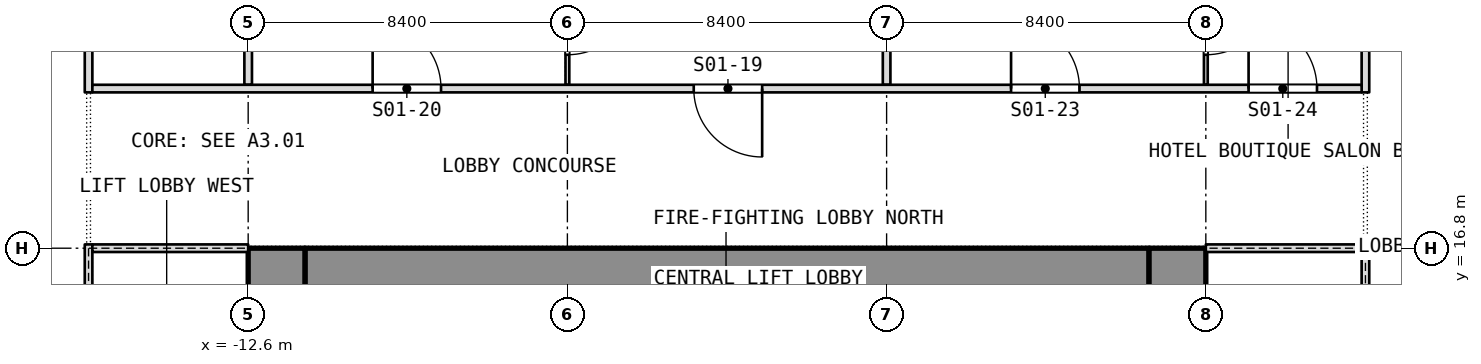
"""IFC4 building model, lengths in metres.
Left out: names, types, materials, properties, quantities, classifications, styles, units other than length and angle.
Written with IfcOpenShell. Run it as: python <this file> out.ifc"""

import sys

from ifc_helpers import new_model, si_unit, direction, frame, frame_2d, origin, place, context, subcontext, project, spatial, rectangle, extrude, element, fill, save


model = new_model("IFC4")
c1 = context("Model", 3, precision=1e-05, world=origin(), true_north=direction((0.0, 1.0)))
c2 = subcontext(c1, "Body", "Model", "MODEL_VIEW")
j1 = project(units=[si_unit("LENGTHUNIT", "METRE"), si_unit("PLANEANGLEUNIT", "RADIAN")], contexts=[c1])
p1 = place(None, origin())
s1 = spatial("IfcSite", under=j1, at=p1, CompositionType="ELEMENT")
p2 = place(p1, origin())
s2 = spatial("IfcBuilding", under=s1, at=p2, CompositionType="ELEMENT")
p3 = place(p2, origin())
s3 = spatial("IfcBuildingStorey", under=s2, at=p3, CompositionType="ELEMENT", Elevation=0.0)
p4 = place(p3, frame((11.85, 0.0, -0.3), z_axis=(0.0, 0.0, 1.0), x_axis=(0.0, 1.0, 0.0)))
e1 = element("IfcWall", 1, at=p4, inside=s3, PredefinedType="SHEAR", context=c2, shape_type="SweptSolid", body=[
    extrude(rectangle(XDim=16.8, YDim=1.5, at=frame_2d((8.4, 0.0))), origin(), (0.0, 0.0, 1.0), 8.3),
])
p5 = place(p4, frame((3.6, 0.0, 0.3)))
e2 = element("IfcOpeningElement", 2, at=p5, cuts=e1, PredefinedType="OPENING", context=c2, shape_type="SweptSolid", body=[
    extrude(rectangle(XDim=0.9, YDim=2.1, at=frame_2d((0.45, 1.05))), frame((0.0, 0.75, 0.0), z_axis=(0.0, -1.0, 0.0), x_axis=(1.0, 0.0, 0.0)), (0.0, 0.0, 1.0), 1.5),
])
p6 = place(p4, frame((6.825, 0.0, 0.3)))
e3 = element("IfcOpeningElement", 3, at=p6, cuts=e1, PredefinedType="OPENING", context=c2, shape_type="SweptSolid", body=[
    extrude(rectangle(XDim=1.2, YDim=2.1, at=frame_2d((0.6, 1.05))), frame((0.0, 0.75, 0.0), z_axis=(0.0, -1.0, 0.0), x_axis=(1.0, 0.0, 0.0)), (0.0, 0.0, 1.0), 1.5),
])
p7 = place(p4, frame((12.3, 0.0, 0.3)))
e4 = element("IfcOpeningElement", 4, at=p7, cuts=e1, PredefinedType="OPENING", context=c2, shape_type="SweptSolid", body=[
    extrude(rectangle(XDim=0.9, YDim=2.1, at=frame_2d((0.45, 1.05))), frame((0.0, 0.75, 0.0), z_axis=(0.0, -1.0, 0.0), x_axis=(1.0, 0.0, 0.0)), (0.0, 0.0, 1.0), 1.5),
])
p8 = place(p4, frame((8.775, 0.0, 0.3)))
e5 = element("IfcOpeningElement", 5, at=p8, cuts=e1, PredefinedType="OPENING", context=c2, shape_type="SweptSolid", body=[
    extrude(rectangle(XDim=1.2, YDim=2.1, at=frame_2d((0.6, 1.05))), frame((0.0, 0.75, 0.0), z_axis=(0.0, -1.0, 0.0), x_axis=(1.0, 0.0, 0.0)), (0.0, 0.0, 1.0), 1.5),
])
p9 = place(p3, frame((-11.85, 0.0, -0.3), z_axis=(0.0, 0.0, 1.0), x_axis=(0.0, 1.0, 0.0)))
e6 = element("IfcWall", 6, at=p9, inside=s3, PredefinedType="SHEAR", context=c2, shape_type="SweptSolid", body=[
    extrude(rectangle(XDim=16.8, YDim=1.5, at=frame_2d((8.4, 0.0))), origin(), (0.0, 0.0, 1.0), 8.3),
])
p10 = place(p9, frame((2.3, 0.0, 0.3)))
e7 = element("IfcOpeningElement", 7, at=p10, cuts=e6, PredefinedType="OPENING", context=c2, shape_type="SweptSolid", body=[
    extrude(rectangle(XDim=1.1, YDim=2.1, at=frame_2d((0.55, 1.05))), frame((0.0, 0.75, 0.0), z_axis=(0.0, -1.0, 0.0), x_axis=(1.0, 0.0, 0.0)), (0.0, 0.0, 1.0), 1.5),
])
p11 = place(p9, frame((4.85, 0.0, 0.3)))
e8 = element("IfcOpeningElement", 8, at=p11, cuts=e6, PredefinedType="OPENING", context=c2, shape_type="SweptSolid", body=[
    extrude(rectangle(XDim=1.1, YDim=2.1, at=frame_2d((0.55, 1.05))), frame((0.0, 0.75, 0.0), z_axis=(0.0, -1.0, 0.0), x_axis=(1.0, 0.0, 0.0)), (0.0, 0.0, 1.0), 1.5),
])
p12 = place(p9, frame((6.825, 0.0, 0.3)))
e9 = element("IfcOpeningElement", 9, at=p12, cuts=e6, PredefinedType="OPENING", context=c2, shape_type="SweptSolid", body=[
    extrude(rectangle(XDim=1.2, YDim=2.1, at=frame_2d((0.6, 1.05))), frame((0.0, 0.75, 0.0), z_axis=(0.0, -1.0, 0.0), x_axis=(1.0, 0.0, 0.0)), (0.0, 0.0, 1.0), 1.5),
])
p13 = place(p9, frame((13.4, 0.0, 0.3)))
e10 = element("IfcOpeningElement", 10, at=p13, cuts=e6, PredefinedType="OPENING", context=c2, shape_type="SweptSolid", body=[
    extrude(rectangle(XDim=1.1, YDim=2.1, at=frame_2d((0.55, 1.05))), frame((0.0, 0.75, 0.0), z_axis=(0.0, -1.0, 0.0), x_axis=(1.0, 0.0, 0.0)), (0.0, 0.0, 1.0), 1.5),
])
p14 = place(p9, frame((10.85, 0.0, 0.3)))
e11 = element("IfcOpeningElement", 11, at=p14, cuts=e6, PredefinedType="OPENING", context=c2, shape_type="SweptSolid", body=[
    extrude(rectangle(XDim=1.1, YDim=2.1, at=frame_2d((0.55, 1.05))), frame((0.0, 0.75, 0.0), z_axis=(0.0, -1.0, 0.0), x_axis=(1.0, 0.0, 0.0)), (0.0, 0.0, 1.0), 1.5),
])
p15 = place(p9, frame((8.775, 0.0, 0.3)))
e12 = element("IfcOpeningElement", 12, at=p15, cuts=e6, PredefinedType="OPENING", context=c2, shape_type="SweptSolid", body=[
    extrude(rectangle(XDim=1.2, YDim=2.1, at=frame_2d((0.6, 1.05))), frame((0.0, 0.75, 0.0), z_axis=(0.0, -1.0, 0.0), x_axis=(1.0, 0.0, 0.0)), (0.0, 0.0, 1.0), 1.5),
])
p16 = place(p3, frame((-11.1, 16.05, -0.3), z_axis=(0.0, 0.0, 1.0), x_axis=(1.0, 0.0, 0.0)))
e13 = element("IfcWall", 13, at=p16, inside=s3, PredefinedType="SHEAR", context=c2, shape_type="SweptSolid", body=[
    extrude(rectangle(XDim=22.2, YDim=1.5, at=frame_2d((11.1, 0.0))), origin(), (0.0, 0.0, 1.0), 8.3),
])
p17 = place(p3, frame((16.8, 20.9, 0.0), z_axis=(0.0, 0.0, 1.0), x_axis=(0.0, 1.0, 0.0)))
e14 = element("IfcWall", 14, at=p17, inside=s3, PredefinedType="PARTITIONING", context=c2, shape_type="SweptSolid", body=[
    extrude(rectangle(XDim=15.0, YDim=0.2, at=frame_2d((7.5, 0.0))), origin(), (0.0, 0.0, 1.0), 7.68),
])
p18 = place(p3, frame((12.6, 21.1, 0.0), z_axis=(0.0, 0.0, 1.0), x_axis=(0.0, 1.0, 0.0)))
e15 = element("IfcWall", 15, at=p18, inside=s3, PredefinedType="PARTITIONING", context=c2, shape_type="SweptSolid", body=[
    extrude(rectangle(XDim=3.38, YDim=0.1, at=frame_2d((1.69, 0.0))), origin(), (0.0, 0.0, 1.0), 7.68),
])
p19 = place(p18, frame((0.79, 0.0, 0.0)))
e16 = element("IfcOpeningElement", 16, at=p19, cuts=e15, PredefinedType="OPENING", context=c2, shape_type="SweptSolid", body=[
    extrude(rectangle(XDim=1.8, YDim=2.1, at=frame_2d((0.9, 1.05))), frame((0.0, 0.05, 0.0), z_axis=(0.0, -1.0, 0.0), x_axis=(1.0, 0.0, 0.0)), (0.0, 0.0, 1.0), 0.1),
])
p20 = place(p3, frame((4.2, 21.1, 0.0), z_axis=(0.0, 0.0, 1.0), x_axis=(0.0, 1.0, 0.0)))
e17 = element("IfcWall", 17, at=p20, inside=s3, PredefinedType="PARTITIONING", context=c2, shape_type="SweptSolid", body=[
    extrude(rectangle(XDim=10.73, YDim=0.2, at=frame_2d((5.365, 0.0))), origin(), (0.0, 0.0, 1.0), 7.68),
])
p21 = place(p3, frame((-4.2, 21.1, 0.0), z_axis=(0.0, 0.0, 1.0), x_axis=(0.0, 1.0, 0.0)))
e18 = element("IfcWall", 18, at=p21, inside=s3, PredefinedType="PARTITIONING", context=c2, shape_type="SweptSolid", body=[
    extrude(rectangle(XDim=3.38, YDim=0.1, at=frame_2d((1.69, 0.0))), origin(), (0.0, 0.0, 1.0), 7.68),
])
p22 = place(p21, frame((0.79, 0.0, 0.0)))
e19 = element("IfcOpeningElement", 19, at=p22, cuts=e18, PredefinedType="OPENING", context=c2, shape_type="SweptSolid", body=[
    extrude(rectangle(XDim=1.8, YDim=2.1, at=frame_2d((0.9, 1.05))), frame((0.0, 0.05, 0.0), z_axis=(0.0, -1.0, 0.0), x_axis=(1.0, 0.0, 0.0)), (0.0, 0.0, 1.0), 0.1),
])
p23 = place(p3, frame((-12.6, 21.1, 0.0), z_axis=(0.0, 0.0, 1.0), x_axis=(0.0, 1.0, 0.0)))
e20 = element("IfcWall", 20, at=p23, inside=s3, PredefinedType="PARTITIONING", context=c2, shape_type="SweptSolid", body=[
    extrude(rectangle(XDim=10.994, YDim=0.2, at=frame_2d((5.497, 0.0))), origin(), (0.0, 0.0, 1.0), 7.68),
])
p24 = place(p3, frame((-16.8, 20.9, 0.0), z_axis=(0.0, 0.0, 1.0), x_axis=(0.0, 1.0, 0.0)))
e21 = element("IfcWall", 21, at=p24, inside=s3, PredefinedType="PARTITIONING", context=c2, shape_type="SweptSolid", body=[
    extrude(rectangle(XDim=13.8, YDim=0.2, at=frame_2d((6.9, 0.0))), origin(), (0.0, 0.0, 1.0), 7.68),
])
p25 = place(p24, frame((2.5, 0.0, 0.0)))
e22 = element("IfcOpeningElement", 22, at=p25, cuts=e21, PredefinedType="OPENING", context=c2, shape_type="SweptSolid", body=[
    extrude(rectangle(XDim=1.0, YDim=2.1, at=frame_2d((0.5, 1.05))), frame((0.0, 0.1, 0.0), z_axis=(0.0, -1.0, 0.0), x_axis=(1.0, 0.0, 0.0)), (0.0, 0.0, 1.0), 0.2),
])
p26 = place(p3, frame((-16.7, 21.0, 0.0), z_axis=(0.0, 0.0, 1.0), x_axis=(1.0, 0.0, 0.0)))
e23 = element("IfcWall", 23, at=p26, inside=s3, PredefinedType="PARTITIONING", context=c2, shape_type="SweptSolid", body=[
    extrude(rectangle(XDim=33.4, YDim=0.2, at=frame_2d((16.7, 0.0))), origin(), (0.0, 0.0, 1.0), 7.68),
])
p27 = place(p26, frame((15.825, 0.0, 0.0)))
e24 = element("IfcOpeningElement", 24, at=p27, cuts=e23, PredefinedType="OPENING", context=c2, shape_type="SweptSolid", body=[
    extrude(rectangle(XDim=1.8, YDim=2.1, at=frame_2d((0.9, 1.05))), frame((0.0, 0.1, 0.0), z_axis=(0.0, -1.0, 0.0), x_axis=(1.0, 0.0, 0.0)), (0.0, 0.0, 1.0), 0.2),
])
p28 = place(p26, frame((7.375, 0.0, 0.0)))
e25 = element("IfcOpeningElement", 25, at=p28, cuts=e23, PredefinedType="OPENING", context=c2, shape_type="SweptSolid", body=[
    extrude(rectangle(XDim=1.8, YDim=2.1, at=frame_2d((0.9, 1.05))), frame((0.0, 0.1, 0.0), z_axis=(0.0, -1.0, 0.0), x_axis=(1.0, 0.0, 0.0)), (0.0, 0.0, 1.0), 0.2),
])
p29 = place(p26, frame((24.175, 0.0, 0.0)))
e26 = element("IfcOpeningElement", 26, at=p29, cuts=e23, PredefinedType="OPENING", context=c2, shape_type="SweptSolid", body=[
    extrude(rectangle(XDim=1.8, YDim=2.1, at=frame_2d((0.9, 1.05))), frame((0.0, 0.1, 0.0), z_axis=(0.0, -1.0, 0.0), x_axis=(1.0, 0.0, 0.0)), (0.0, 0.0, 1.0), 0.2),
])
p30 = place(p26, frame((30.425, 0.0, 0.0)))
e27 = element("IfcOpeningElement", 27, at=p30, cuts=e23, PredefinedType="OPENING", context=c2, shape_type="SweptSolid", body=[
    extrude(rectangle(XDim=1.8, YDim=2.1, at=frame_2d((0.9, 1.05))), frame((0.0, 0.1, 0.0), z_axis=(0.0, -1.0, 0.0), x_axis=(1.0, 0.0, 0.0)), (0.0, 0.0, 1.0), 0.2),
])
p31 = place(p3, frame((-16.8, -0.1, 0.0), z_axis=(0.0, 0.0, 1.0), x_axis=(0.0, 1.0, 0.0)))
e28 = element("IfcWall", 28, at=p31, inside=s3, PredefinedType="PARTITIONING", context=c2, shape_type="SweptSolid", body=[
    extrude(rectangle(XDim=17.0, YDim=0.2, at=frame_2d((8.5, 0.0))), origin(), (0.0, 0.0, 1.0), 7.78),
])
p32 = place(p31, frame((1.9, 0.0, 0.0)))
e29 = element("IfcOpeningElement", 29, at=p32, cuts=e28, PredefinedType="OPENING", context=c2, shape_type="SweptSolid", body=[
    extrude(rectangle(XDim=2.4, YDim=2.1, at=frame_2d((1.2, 1.05))), frame((0.0, 0.1, 0.0), z_axis=(0.0, -1.0, 0.0), x_axis=(1.0, 0.0, 0.0)), (0.0, 0.0, 1.0), 0.2),
])
p33 = place(p31, frame((12.7, 0.0, 0.0)))
e30 = element("IfcOpeningElement", 30, at=p33, cuts=e28, PredefinedType="OPENING", context=c2, shape_type="SweptSolid", body=[
    extrude(rectangle(XDim=2.4, YDim=2.1, at=frame_2d((1.2, 1.05))), frame((0.0, 0.1, 0.0), z_axis=(0.0, -1.0, 0.0), x_axis=(1.0, 0.0, 0.0)), (0.0, 0.0, 1.0), 0.2),
])
p34 = place(p3, frame((-16.7, 16.8, 0.0), z_axis=(0.0, 0.0, 1.0), x_axis=(1.0, 0.0, 0.0)))
e31 = element("IfcWall", 31, at=p34, inside=s3, PredefinedType="PARTITIONING", context=c2, shape_type="SweptSolid", body=[
    extrude(rectangle(XDim=4.1, YDim=0.2, at=frame_2d((2.05, 0.0))), origin(), (0.0, 0.0, 1.0), 7.78),
])
p35 = place(p3, frame((16.8, -0.1, 0.0), z_axis=(0.0, 0.0, 1.0), x_axis=(0.0, 1.0, 0.0)))
e32 = element("IfcWall", 32, at=p35, inside=s3, PredefinedType="PARTITIONING", context=c2, shape_type="SweptSolid", body=[
    extrude(rectangle(XDim=17.0, YDim=0.2, at=frame_2d((8.5, 0.0))), origin(), (0.0, 0.0, 1.0), 7.78),
])
p36 = place(p35, frame((1.9, 0.0, 0.0)))
e33 = element("IfcOpeningElement", 33, at=p36, cuts=e32, PredefinedType="OPENING", context=c2, shape_type="SweptSolid", body=[
    extrude(rectangle(XDim=2.4, YDim=2.1, at=frame_2d((1.2, 1.05))), frame((0.0, 0.1, 0.0), z_axis=(0.0, -1.0, 0.0), x_axis=(1.0, 0.0, 0.0)), (0.0, 0.0, 1.0), 0.2),
])
p37 = place(p35, frame((12.7, 0.0, 0.0)))
e34 = element("IfcOpeningElement", 34, at=p37, cuts=e32, PredefinedType="OPENING", context=c2, shape_type="SweptSolid", body=[
    extrude(rectangle(XDim=2.4, YDim=2.1, at=frame_2d((1.2, 1.05))), frame((0.0, 0.1, 0.0), z_axis=(0.0, -1.0, 0.0), x_axis=(1.0, 0.0, 0.0)), (0.0, 0.0, 1.0), 0.2),
])
p38 = place(p3, frame((12.6, 16.8, 0.0), z_axis=(0.0, 0.0, 1.0), x_axis=(1.0, 0.0, 0.0)))
e35 = element("IfcWall", 35, at=p38, inside=s3, PredefinedType="PARTITIONING", context=c2, shape_type="SweptSolid", body=[
    extrude(rectangle(XDim=4.1, YDim=0.2, at=frame_2d((2.05, 0.0))), origin(), (0.0, 0.0, 1.0), 7.78),
])
p39 = place(p19, origin())
e36 = element("IfcDoor", 36, at=p39, inside=s3, OperationType="DOUBLE_DOOR_SINGLE_SWING", PredefinedType="DOOR", context=c2, shape_type="SweptSolid", body=[
    extrude(rectangle(XDim=1.8, YDim=2.1, at=frame_2d((0.9, 1.05))), frame((0.0, 0.025, 0.0), z_axis=(0.0, -1.0, 0.0), x_axis=(1.0, 0.0, 0.0)), (0.0, 0.0, 1.0), 0.05),
])
fill(e16, e36)
p40 = place(p22, origin())
e37 = element("IfcDoor", 37, at=p40, inside=s3, OperationType="DOUBLE_DOOR_SINGLE_SWING", PredefinedType="DOOR", context=c2, shape_type="SweptSolid", body=[
    extrude(rectangle(XDim=1.8, YDim=2.1, at=frame_2d((0.9, 1.05))), frame((0.0, 0.025, 0.0), z_axis=(0.0, -1.0, 0.0), x_axis=(1.0, 0.0, 0.0)), (0.0, 0.0, 1.0), 0.05),
])
fill(e19, e37)
p41 = place(p27, origin())
e38 = element("IfcDoor", 38, at=p41, inside=s3, OperationType="DOUBLE_DOOR_SINGLE_SWING", PredefinedType="DOOR", context=c2, shape_type="SweptSolid", body=[
    extrude(rectangle(XDim=1.8, YDim=2.1, at=frame_2d((0.9, 1.05))), frame((0.0, 0.025, 0.0), z_axis=(0.0, -1.0, 0.0), x_axis=(1.0, 0.0, 0.0)), (0.0, 0.0, 1.0), 0.05),
])
fill(e24, e38)
p42 = place(p28, origin())
e39 = element("IfcDoor", 39, at=p42, inside=s3, OperationType="DOUBLE_DOOR_SINGLE_SWING", PredefinedType="DOOR", context=c2, shape_type="SweptSolid", body=[
    extrude(rectangle(XDim=1.8, YDim=2.1, at=frame_2d((0.9, 1.05))), frame((0.0, 0.025, 0.0), z_axis=(0.0, -1.0, 0.0), x_axis=(1.0, 0.0, 0.0)), (0.0, 0.0, 1.0), 0.05),
])
fill(e25, e39)
p43 = place(p29, origin())
e40 = element("IfcDoor", 40, at=p43, inside=s3, OperationType="DOUBLE_DOOR_SINGLE_SWING", PredefinedType="DOOR", context=c2, shape_type="SweptSolid", body=[
    extrude(rectangle(XDim=1.8, YDim=2.1, at=frame_2d((0.9, 1.05))), frame((0.0, 0.025, 0.0), z_axis=(0.0, -1.0, 0.0), x_axis=(1.0, 0.0, 0.0)), (0.0, 0.0, 1.0), 0.05),
])
fill(e26, e40)
p44 = place(p30, origin())
e41 = element("IfcDoor", 41, at=p44, inside=s3, OperationType="DOUBLE_DOOR_SINGLE_SWING", PredefinedType="DOOR", context=c2, shape_type="SweptSolid", body=[
    extrude(rectangle(XDim=1.8, YDim=2.1, at=frame_2d((0.9, 1.05))), frame((0.0, 0.025, 0.0), z_axis=(0.0, -1.0, 0.0), x_axis=(1.0, 0.0, 0.0)), (0.0, 0.0, 1.0), 0.05),
])
fill(e27, e41)
save(model, sys.argv[1])
